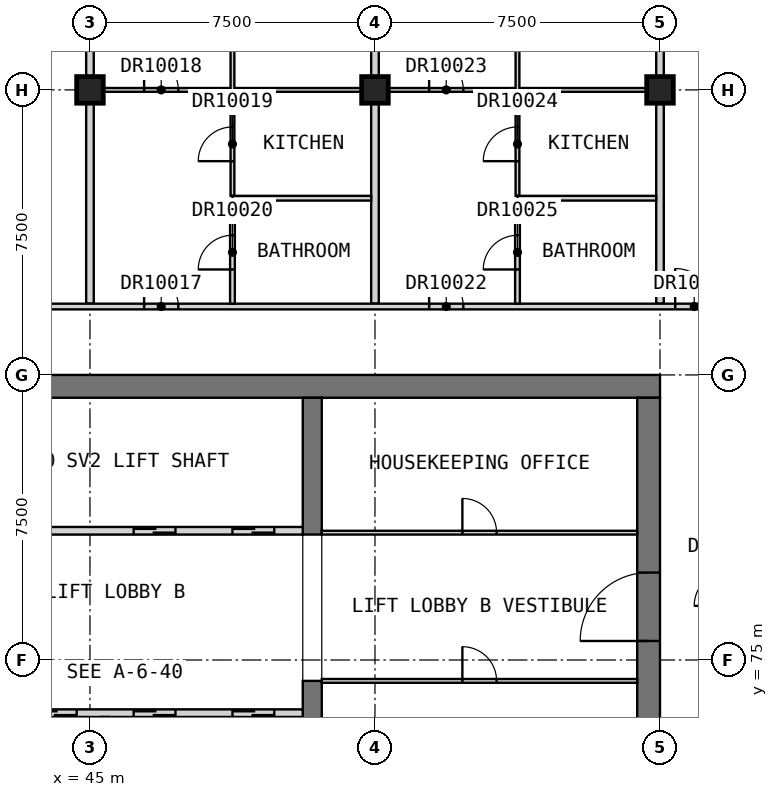
"""IFC4 building model, lengths in metres.
Left out: names, types, materials, properties, quantities, classifications, styles, units other than length and angle.
Written with IfcOpenShell. Run it as: python <this file> out.ifc"""

import sys

from ifc_helpers import new_model, si_unit, direction, frame, frame_2d, origin, origin_2d, place, context, subcontext, project, spatial, rectangle, extrude, element, fill, save


model = new_model("IFC4")
c1 = context("Model", 3, precision=1e-05, world=origin(), true_north=direction((0.0, 1.0)))
c2 = subcontext(c1, "Body", "Model", "MODEL_VIEW")
j1 = project(units=[si_unit("LENGTHUNIT", "METRE"), si_unit("PLANEANGLEUNIT", "RADIAN")], contexts=[c1])
p1 = place(None, origin())
s1 = spatial("IfcSite", under=j1, at=p1, CompositionType="ELEMENT")
p2 = place(p1, origin())
s2 = spatial("IfcBuilding", under=s1, at=p2, CompositionType="ELEMENT")
p3 = place(p2, frame((0.0, 0.0, 273.2)))
s3 = spatial("IfcBuildingStorey", under=s2, at=p3, CompositionType="ELEMENT", Elevation=273.2)
for number, where, z_axis, x_axis in (
    (1, (45.0, 90.0, 0.0), (0.0, 0.0, 1.0), (1.0, 0.0, 0.0)),
    (2, (52.5, 90.0, 0.0), (0.0, 0.0, 1.0), (1.0, 0.0, 0.0)),
    (3, (60.0, 90.0, 0.0), (0.0, 0.0, 1.0), (1.0, 0.0, 0.0)),
):
    element("IfcColumn", number, at=place(p3, frame(where, z_axis=z_axis, x_axis=x_axis)), inside=s3, PredefinedType="COLUMN", context=c2, shape_type="SweptSolid", body=[
        extrude(rectangle(XDim=0.7, YDim=0.7, at=origin_2d()), origin(), (0.0, 0.0, 1.0), 3.5),
    ])
p4 = place(p3, frame((30.0, 82.2, 0.0), z_axis=(0.0, 0.0, 1.0), x_axis=(1.0, 0.0, 0.0)))
e4 = element("IfcWall", 4, at=p4, inside=s3, PredefinedType="SHEAR", context=c2, shape_type="SweptSolid", body=[
    extrude(rectangle(XDim=30.0, YDim=0.6, at=frame_2d((15.0, 0.0))), origin(), (0.0, 0.0, 1.0), 3.5),
])
p5 = place(p3, frame((59.7, 60.6, 0.0), z_axis=(0.0, 0.0, 1.0), x_axis=(0.0, 1.0, 0.0)))
e5 = element("IfcWall", 5, at=p5, inside=s3, PredefinedType="SHEAR", context=c2, shape_type="SweptSolid", body=[
    extrude(rectangle(XDim=21.3, YDim=0.6, at=frame_2d((10.65, 0.0))), origin(), (0.0, 0.0, 1.0), 3.5),
])
p6 = place(p5, frame((14.9, 0.0, 0.0)))
e6 = element("IfcOpeningElement", 6, at=p6, cuts=e5, PredefinedType="OPENING", context=c2, shape_type="SweptSolid", body=[
    extrude(rectangle(XDim=1.8, YDim=2.1, at=frame_2d((0.9, 1.05))), frame((0.0, 0.31, 0.0), z_axis=(0.0, -1.0, 0.0), x_axis=(1.0, 0.0, 0.0)), (0.0, 0.0, 1.0), 0.62),
])
p7 = place(p3, frame((50.85, 68.05, 0.0), z_axis=(0.0, 0.0, 1.0), x_axis=(0.0, 1.0, 0.0)))
e7 = element("IfcWall", 7, at=p7, inside=s3, PredefinedType="SHEAR", context=c2, shape_type="SweptSolid", body=[
    extrude(rectangle(XDim=6.4, YDim=0.5, at=frame_2d((3.2, 0.0))), origin(), (0.0, 0.0, 1.0), 3.5),
])
p8 = place(p3, frame((50.85, 78.3, 0.0), z_axis=(0.0, 0.0, 1.0), x_axis=(0.0, 1.0, 0.0)))
e8 = element("IfcWall", 8, at=p8, inside=s3, PredefinedType="SHEAR", context=c2, shape_type="SweptSolid", body=[
    extrude(rectangle(XDim=3.6, YDim=0.5, at=frame_2d((1.8, 0.0))), origin(), (0.0, 0.0, 1.0), 3.5),
])
p9 = place(p3, frame((35.0, 73.6, 0.0), z_axis=(0.0, 0.0, 1.0), x_axis=(1.0, 0.0, 0.0)))
e9 = element("IfcWall", 9, at=p9, inside=s3, PredefinedType="SOLIDWALL", context=c2, shape_type="SweptSolid", body=[
    extrude(rectangle(XDim=15.6, YDim=0.2, at=frame_2d((7.8, 0.0))), origin(), (0.0, 0.0, 1.0), 3.5),
])
p10 = place(p9, frame((0.75, 0.0, 0.0)))
e10 = element("IfcOpeningElement", 10, at=p10, cuts=e9, PredefinedType="OPENING", context=c2, shape_type="SweptSolid", body=[
    extrude(rectangle(XDim=1.1, YDim=2.1, at=frame_2d((0.55, 1.05))), frame((0.0, 0.11, 0.0), z_axis=(0.0, -1.0, 0.0), x_axis=(1.0, 0.0, 0.0)), (0.0, 0.0, 1.0), 0.22),
])
p11 = place(p9, frame((3.35, 0.0, 0.0)))
e11 = element("IfcOpeningElement", 11, at=p11, cuts=e9, PredefinedType="OPENING", context=c2, shape_type="SweptSolid", body=[
    extrude(rectangle(XDim=1.1, YDim=2.1, at=frame_2d((0.55, 1.05))), frame((0.0, 0.11, 0.0), z_axis=(0.0, -1.0, 0.0), x_axis=(1.0, 0.0, 0.0)), (0.0, 0.0, 1.0), 0.22),
])
p12 = place(p9, frame((5.95, 0.0, 0.0)))
e12 = element("IfcOpeningElement", 12, at=p12, cuts=e9, PredefinedType="OPENING", context=c2, shape_type="SweptSolid", body=[
    extrude(rectangle(XDim=1.1, YDim=2.1, at=frame_2d((0.55, 1.05))), frame((0.0, 0.11, 0.0), z_axis=(0.0, -1.0, 0.0), x_axis=(1.0, 0.0, 0.0)), (0.0, 0.0, 1.0), 0.22),
])
p13 = place(p9, frame((8.55, 0.0, 0.0)))
e13 = element("IfcOpeningElement", 13, at=p13, cuts=e9, PredefinedType="OPENING", context=c2, shape_type="SweptSolid", body=[
    extrude(rectangle(XDim=1.1, YDim=2.1, at=frame_2d((0.55, 1.05))), frame((0.0, 0.11, 0.0), z_axis=(0.0, -1.0, 0.0), x_axis=(1.0, 0.0, 0.0)), (0.0, 0.0, 1.0), 0.22),
])
p14 = place(p9, frame((11.15, 0.0, 0.0)))
e14 = element("IfcOpeningElement", 14, at=p14, cuts=e9, PredefinedType="OPENING", context=c2, shape_type="SweptSolid", body=[
    extrude(rectangle(XDim=1.1, YDim=2.1, at=frame_2d((0.55, 1.05))), frame((0.0, 0.11, 0.0), z_axis=(0.0, -1.0, 0.0), x_axis=(1.0, 0.0, 0.0)), (0.0, 0.0, 1.0), 0.22),
])
p15 = place(p9, frame((13.75, 0.0, 0.0)))
e15 = element("IfcOpeningElement", 15, at=p15, cuts=e9, PredefinedType="OPENING", context=c2, shape_type="SweptSolid", body=[
    extrude(rectangle(XDim=1.1, YDim=2.1, at=frame_2d((0.55, 1.05))), frame((0.0, 0.11, 0.0), z_axis=(0.0, -1.0, 0.0), x_axis=(1.0, 0.0, 0.0)), (0.0, 0.0, 1.0), 0.22),
])
p16 = place(p3, frame((35.0, 78.4, 0.0), z_axis=(0.0, 0.0, 1.0), x_axis=(1.0, 0.0, 0.0)))
e16 = element("IfcWall", 16, at=p16, inside=s3, PredefinedType="SOLIDWALL", context=c2, shape_type="SweptSolid", body=[
    extrude(rectangle(XDim=15.6, YDim=0.2, at=frame_2d((7.8, 0.0))), origin(), (0.0, 0.0, 1.0), 3.5),
])
p17 = place(p16, frame((0.75, 0.0, 0.0)))
e17 = element("IfcOpeningElement", 17, at=p17, cuts=e16, PredefinedType="OPENING", context=c2, shape_type="SweptSolid", body=[
    extrude(rectangle(XDim=1.1, YDim=2.1, at=frame_2d((0.55, 1.05))), frame((0.0, 0.11, 0.0), z_axis=(0.0, -1.0, 0.0), x_axis=(1.0, 0.0, 0.0)), (0.0, 0.0, 1.0), 0.22),
])
p18 = place(p16, frame((3.35, 0.0, 0.0)))
e18 = element("IfcOpeningElement", 18, at=p18, cuts=e16, PredefinedType="OPENING", context=c2, shape_type="SweptSolid", body=[
    extrude(rectangle(XDim=1.1, YDim=2.1, at=frame_2d((0.55, 1.05))), frame((0.0, 0.11, 0.0), z_axis=(0.0, -1.0, 0.0), x_axis=(1.0, 0.0, 0.0)), (0.0, 0.0, 1.0), 0.22),
])
p19 = place(p16, frame((11.15, 0.0, 0.0)))
e19 = element("IfcOpeningElement", 19, at=p19, cuts=e16, PredefinedType="OPENING", context=c2, shape_type="SweptSolid", body=[
    extrude(rectangle(XDim=1.1, YDim=2.1, at=frame_2d((0.55, 1.05))), frame((0.0, 0.11, 0.0), z_axis=(0.0, -1.0, 0.0), x_axis=(1.0, 0.0, 0.0)), (0.0, 0.0, 1.0), 0.22),
])
p20 = place(p16, frame((13.75, 0.0, 0.0)))
e20 = element("IfcOpeningElement", 20, at=p20, cuts=e16, PredefinedType="OPENING", context=c2, shape_type="SweptSolid", body=[
    extrude(rectangle(XDim=1.1, YDim=2.1, at=frame_2d((0.55, 1.05))), frame((0.0, 0.11, 0.0), z_axis=(0.0, -1.0, 0.0), x_axis=(1.0, 0.0, 0.0)), (0.0, 0.0, 1.0), 0.22),
])
p21 = place(p3, frame((51.1, 74.45, 0.0), z_axis=(0.0, 0.0, 1.0), x_axis=(1.0, 0.0, 0.0)))
e21 = element("IfcWall", 21, at=p21, inside=s3, PredefinedType="PARTITIONING", context=c2, shape_type="SweptSolid", body=[
    extrude(rectangle(XDim=8.3, YDim=0.1, at=frame_2d((4.15, 0.0))), origin(), (0.0, 0.0, 1.0), 3.25),
])
p22 = place(p21, frame((3.7, 0.0, 0.0)))
e22 = element("IfcOpeningElement", 22, at=p22, cuts=e21, PredefinedType="OPENING", context=c2, shape_type="SweptSolid", body=[
    extrude(rectangle(XDim=0.9, YDim=2.1, at=frame_2d((0.45, 1.05))), frame((0.0, 0.06, 0.0), z_axis=(0.0, -1.0, 0.0), x_axis=(1.0, 0.0, 0.0)), (0.0, 0.0, 1.0), 0.12),
])
p23 = place(p3, frame((51.1, 78.35, 0.0), z_axis=(0.0, 0.0, 1.0), x_axis=(1.0, 0.0, 0.0)))
e23 = element("IfcWall", 23, at=p23, inside=s3, PredefinedType="PARTITIONING", context=c2, shape_type="SweptSolid", body=[
    extrude(rectangle(XDim=8.3, YDim=0.1, at=frame_2d((4.15, 0.0))), origin(), (0.0, 0.0, 1.0), 3.25),
])
p24 = place(p23, frame((3.7, 0.0, 0.0)))
e24 = element("IfcOpeningElement", 24, at=p24, cuts=e23, PredefinedType="OPENING", context=c2, shape_type="SweptSolid", body=[
    extrude(rectangle(XDim=0.9, YDim=2.1, at=frame_2d((0.45, 1.05))), frame((0.0, 0.06, 0.0), z_axis=(0.0, -1.0, 0.0), x_axis=(1.0, 0.0, 0.0)), (0.0, 0.0, 1.0), 0.12),
])
for number, where, z_axis, x_axis in (
    (25, (45.0, 84.375, 0.0), (0.0, 0.0, 1.0), (0.0, 1.0, 0.0)),
    (26, (52.5, 84.375, 0.0), (0.0, 0.0, 1.0), (0.0, 1.0, 0.0)),
    (27, (60.0, 84.375, 0.0), (0.0, 0.0, 1.0), (0.0, 1.0, 0.0)),
):
    element("IfcWall", number, at=place(p3, frame(where, z_axis=z_axis, x_axis=x_axis)), inside=s3, PredefinedType="PARTITIONING", context=c2, shape_type="SweptSolid", body=[
        extrude(rectangle(XDim=13.125, YDim=0.2, at=frame_2d((6.562, 0.0))), origin(), (0.0, 0.0, 1.0), 3.25),
    ])
p25 = place(p3, frame((33.75, 84.3, 0.0), z_axis=(0.0, 0.0, 1.0), x_axis=(1.0, 0.0, 0.0)))
e28 = element("IfcWall", 28, at=p25, inside=s3, PredefinedType="PARTITIONING", context=c2, shape_type="SweptSolid", body=[
    extrude(rectangle(XDim=28.05, YDim=0.15, at=frame_2d((14.025, 0.0))), origin(), (0.0, 0.0, 1.0), 3.25),
])
p26 = place(p25, frame((5.125, 0.0, 0.0)))
e29 = element("IfcOpeningElement", 29, at=p26, cuts=e28, PredefinedType="OPENING", context=c2, shape_type="SweptSolid", body=[
    extrude(rectangle(XDim=1.0, YDim=2.1, at=frame_2d((0.5, 1.05))), frame((0.0, 0.085, 0.0), z_axis=(0.0, -1.0, 0.0), x_axis=(1.0, 0.0, 0.0)), (0.0, 0.0, 1.0), 0.17),
])
p27 = place(p25, frame((12.675, 0.0, 0.0)))
e30 = element("IfcOpeningElement", 30, at=p27, cuts=e28, PredefinedType="OPENING", context=c2, shape_type="SweptSolid", body=[
    extrude(rectangle(XDim=0.9, YDim=2.1, at=frame_2d((0.45, 1.05))), frame((0.0, 0.085, 0.0), z_axis=(0.0, -1.0, 0.0), x_axis=(1.0, 0.0, 0.0)), (0.0, 0.0, 1.0), 0.17),
])
p28 = place(p25, frame((20.175, 0.0, 0.0)))
e31 = element("IfcOpeningElement", 31, at=p28, cuts=e28, PredefinedType="OPENING", context=c2, shape_type="SweptSolid", body=[
    extrude(rectangle(XDim=0.9, YDim=2.1, at=frame_2d((0.45, 1.05))), frame((0.0, 0.085, 0.0), z_axis=(0.0, -1.0, 0.0), x_axis=(1.0, 0.0, 0.0)), (0.0, 0.0, 1.0), 0.17),
])
p29 = place(p25, frame((26.65, 0.0, 0.0)))
e32 = element("IfcOpeningElement", 32, at=p29, cuts=e28, PredefinedType="OPENING", context=c2, shape_type="SweptSolid", body=[
    extrude(rectangle(XDim=1.0, YDim=2.1, at=frame_2d((0.5, 1.05))), frame((0.0, 0.085, 0.0), z_axis=(0.0, -1.0, 0.0), x_axis=(1.0, 0.0, 0.0)), (0.0, 0.0, 1.0), 0.17),
])
p30 = place(p3, frame((45.1, 90.0, 0.0), z_axis=(0.0, 0.0, 1.0), x_axis=(1.0, 0.0, 0.0)))
e33 = element("IfcWall", 33, at=p30, inside=s3, PredefinedType="PARTITIONING", context=c2, shape_type="SweptSolid", body=[
    extrude(rectangle(XDim=14.8, YDim=0.1, at=frame_2d((7.4, 0.0))), origin(), (0.0, 0.0, 1.0), 3.25),
])
p31 = place(p30, frame((1.325, 0.0, 0.0)))
e34 = element("IfcOpeningElement", 34, at=p31, cuts=e33, PredefinedType="OPENING", context=c2, shape_type="SweptSolid", body=[
    extrude(rectangle(XDim=0.9, YDim=2.1, at=frame_2d((0.45, 1.05))), frame((0.0, 0.06, 0.0), z_axis=(0.0, -1.0, 0.0), x_axis=(1.0, 0.0, 0.0)), (0.0, 0.0, 1.0), 0.12),
])
p32 = place(p30, frame((8.825, 0.0, 0.0)))
e35 = element("IfcOpeningElement", 35, at=p32, cuts=e33, PredefinedType="OPENING", context=c2, shape_type="SweptSolid", body=[
    extrude(rectangle(XDim=0.9, YDim=2.1, at=frame_2d((0.45, 1.05))), frame((0.0, 0.06, 0.0), z_axis=(0.0, -1.0, 0.0), x_axis=(1.0, 0.0, 0.0)), (0.0, 0.0, 1.0), 0.12),
])
p33 = place(p3, frame((48.75, 87.212, 0.0), z_axis=(0.0, 0.0, 1.0), x_axis=(0.0, 1.0, 0.0)))
e36 = element("IfcWall", 36, at=p33, inside=s3, PredefinedType="PARTITIONING", context=c2, shape_type="SweptSolid", body=[
    extrude(rectangle(XDim=9.478, YDim=0.1, at=frame_2d((4.739, 0.0))), origin(), (0.0, 0.0, 1.0), 3.25),
])
p34 = place(p33, frame((0.913, 0.0, 0.0)))
e37 = element("IfcOpeningElement", 37, at=p34, cuts=e36, PredefinedType="OPENING", context=c2, shape_type="SweptSolid", body=[
    extrude(rectangle(XDim=0.9, YDim=2.1, at=frame_2d((0.45, 1.05))), frame((0.0, 0.06, 0.0), z_axis=(0.0, -1.0, 0.0), x_axis=(1.0, 0.0, 0.0)), (0.0, 0.0, 1.0), 0.12),
])
p35 = place(p33, frame((6.087, 0.0, 0.0)))
e38 = element("IfcOpeningElement", 38, at=p35, cuts=e36, PredefinedType="OPENING", context=c2, shape_type="SweptSolid", body=[
    extrude(rectangle(XDim=0.9, YDim=2.1, at=frame_2d((0.45, 1.05))), frame((0.0, 0.06, 0.0), z_axis=(0.0, -1.0, 0.0), x_axis=(1.0, 0.0, 0.0)), (0.0, 0.0, 1.0), 0.12),
])
p36 = place(p3, frame((56.25, 87.212, 0.0), z_axis=(0.0, 0.0, 1.0), x_axis=(0.0, 1.0, 0.0)))
e39 = element("IfcWall", 39, at=p36, inside=s3, PredefinedType="PARTITIONING", context=c2, shape_type="SweptSolid", body=[
    extrude(rectangle(XDim=9.478, YDim=0.1, at=frame_2d((4.739, 0.0))), origin(), (0.0, 0.0, 1.0), 3.25),
])
p37 = place(p36, frame((0.913, 0.0, 0.0)))
e40 = element("IfcOpeningElement", 40, at=p37, cuts=e39, PredefinedType="OPENING", context=c2, shape_type="SweptSolid", body=[
    extrude(rectangle(XDim=0.9, YDim=2.1, at=frame_2d((0.45, 1.05))), frame((0.0, 0.06, 0.0), z_axis=(0.0, -1.0, 0.0), x_axis=(1.0, 0.0, 0.0)), (0.0, 0.0, 1.0), 0.12),
])
p38 = place(p36, frame((6.087, 0.0, 0.0)))
e41 = element("IfcOpeningElement", 41, at=p38, cuts=e39, PredefinedType="OPENING", context=c2, shape_type="SweptSolid", body=[
    extrude(rectangle(XDim=0.9, YDim=2.1, at=frame_2d((0.45, 1.05))), frame((0.0, 0.06, 0.0), z_axis=(0.0, -1.0, 0.0), x_axis=(1.0, 0.0, 0.0)), (0.0, 0.0, 1.0), 0.12),
])
for number, where, z_axis, x_axis in (
    (42, (48.75, 87.15, 0.0), (0.0, 0.0, 1.0), (1.0, 0.0, 0.0)),
    (43, (56.25, 87.15, 0.0), (0.0, 0.0, 1.0), (1.0, 0.0, 0.0)),
):
    element("IfcWall", number, at=place(p3, frame(where, z_axis=z_axis, x_axis=x_axis)), inside=s3, PredefinedType="PARTITIONING", context=c2, shape_type="SweptSolid", body=[
        extrude(rectangle(XDim=3.65, YDim=0.125, at=frame_2d((1.825, 0.0))), origin(), (0.0, 0.0, 1.0), 3.25),
    ])
p39 = place(p3, frame((48.75, 84.375, 0.0), z_axis=(0.0, 0.0, 1.0), x_axis=(0.0, 1.0, 0.0)))
e44 = element("IfcWall", 44, at=p39, inside=s3, PredefinedType="PARTITIONING", context=c2, shape_type="SweptSolid", body=[
    extrude(rectangle(XDim=2.712, YDim=0.125, at=frame_2d((1.356, 0.0))), origin(), (0.0, 0.0, 1.0), 3.25),
])
p40 = place(p39, frame((0.9, 0.0, 0.0)))
e45 = element("IfcOpeningElement", 45, at=p40, cuts=e44, PredefinedType="OPENING", context=c2, shape_type="SweptSolid", body=[
    extrude(rectangle(XDim=0.9, YDim=2.1, at=frame_2d((0.45, 1.05))), frame((0.0, 0.073, 0.0), z_axis=(0.0, -1.0, 0.0), x_axis=(1.0, 0.0, 0.0)), (0.0, 0.0, 1.0), 0.145),
])
p41 = place(p3, frame((56.25, 84.375, 0.0), z_axis=(0.0, 0.0, 1.0), x_axis=(0.0, 1.0, 0.0)))
e46 = element("IfcWall", 46, at=p41, inside=s3, PredefinedType="PARTITIONING", context=c2, shape_type="SweptSolid", body=[
    extrude(rectangle(XDim=2.712, YDim=0.125, at=frame_2d((1.356, 0.0))), origin(), (0.0, 0.0, 1.0), 3.25),
])
p42 = place(p41, frame((0.9, 0.0, 0.0)))
e47 = element("IfcOpeningElement", 47, at=p42, cuts=e46, PredefinedType="OPENING", context=c2, shape_type="SweptSolid", body=[
    extrude(rectangle(XDim=0.9, YDim=2.1, at=frame_2d((0.45, 1.05))), frame((0.0, 0.073, 0.0), z_axis=(0.0, -1.0, 0.0), x_axis=(1.0, 0.0, 0.0)), (0.0, 0.0, 1.0), 0.145),
])
p43 = place(p13, origin())
e48 = element("IfcDoor", 48, at=p43, inside=s3, OperationType="DOUBLE_DOOR_SLIDING", PredefinedType="DOOR", context=c2, shape_type="SweptSolid", body=[
    extrude(rectangle(XDim=1.1, YDim=2.1, at=frame_2d((0.55, 1.05))), frame((0.0, 0.025, 0.0), z_axis=(0.0, -1.0, 0.0), x_axis=(1.0, 0.0, 0.0)), (0.0, 0.0, 1.0), 0.05),
])
fill(e13, e48)
p44 = place(p14, origin())
e49 = element("IfcDoor", 49, at=p44, inside=s3, OperationType="DOUBLE_DOOR_SLIDING", PredefinedType="DOOR", context=c2, shape_type="SweptSolid", body=[
    extrude(rectangle(XDim=1.1, YDim=2.1, at=frame_2d((0.55, 1.05))), frame((0.0, 0.025, 0.0), z_axis=(0.0, -1.0, 0.0), x_axis=(1.0, 0.0, 0.0)), (0.0, 0.0, 1.0), 0.05),
])
fill(e14, e49)
p45 = place(p15, origin())
e50 = element("IfcDoor", 50, at=p45, inside=s3, OperationType="DOUBLE_DOOR_SLIDING", PredefinedType="DOOR", context=c2, shape_type="SweptSolid", body=[
    extrude(rectangle(XDim=1.1, YDim=2.1, at=frame_2d((0.55, 1.05))), frame((0.0, 0.025, 0.0), z_axis=(0.0, -1.0, 0.0), x_axis=(1.0, 0.0, 0.0)), (0.0, 0.0, 1.0), 0.05),
])
fill(e15, e50)
p46 = place(p19, origin())
e51 = element("IfcDoor", 51, at=p46, inside=s3, OperationType="DOUBLE_DOOR_SLIDING", PredefinedType="DOOR", context=c2, shape_type="SweptSolid", body=[
    extrude(rectangle(XDim=1.1, YDim=2.1, at=frame_2d((0.55, 1.05))), frame((0.0, 0.025, 0.0), z_axis=(0.0, -1.0, 0.0), x_axis=(1.0, 0.0, 0.0)), (0.0, 0.0, 1.0), 0.05),
])
fill(e19, e51)
p47 = place(p20, origin())
e52 = element("IfcDoor", 52, at=p47, inside=s3, OperationType="DOUBLE_DOOR_SLIDING", PredefinedType="DOOR", context=c2, shape_type="SweptSolid", body=[
    extrude(rectangle(XDim=1.1, YDim=2.1, at=frame_2d((0.55, 1.05))), frame((0.0, 0.025, 0.0), z_axis=(0.0, -1.0, 0.0), x_axis=(1.0, 0.0, 0.0)), (0.0, 0.0, 1.0), 0.05),
])
fill(e20, e52)
p48 = place(p6, origin())
e53 = element("IfcDoor", 53, at=p48, inside=s3, OperationType="DOUBLE_DOOR_SINGLE_SWING", PredefinedType="DOOR", context=c2, shape_type="SweptSolid", body=[
    extrude(rectangle(XDim=1.8, YDim=2.1, at=frame_2d((0.9, 1.05))), frame((0.0, 0.025, 0.0), z_axis=(0.0, -1.0, 0.0), x_axis=(1.0, 0.0, 0.0)), (0.0, 0.0, 1.0), 0.05),
])
fill(e6, e53)
p49 = place(p22, origin())
e54 = element("IfcDoor", 54, at=p49, inside=s3, OperationType="SINGLE_SWING_RIGHT", PredefinedType="DOOR", context=c2, shape_type="SweptSolid", body=[
    extrude(rectangle(XDim=0.9, YDim=2.1, at=frame_2d((0.45, 1.05))), frame((0.0, 0.025, 0.0), z_axis=(0.0, -1.0, 0.0), x_axis=(1.0, 0.0, 0.0)), (0.0, 0.0, 1.0), 0.05),
])
fill(e22, e54)
p50 = place(p24, origin())
e55 = element("IfcDoor", 55, at=p50, inside=s3, OperationType="SINGLE_SWING_RIGHT", PredefinedType="DOOR", context=c2, shape_type="SweptSolid", body=[
    extrude(rectangle(XDim=0.9, YDim=2.1, at=frame_2d((0.45, 1.05))), frame((0.0, 0.025, 0.0), z_axis=(0.0, -1.0, 0.0), x_axis=(1.0, 0.0, 0.0)), (0.0, 0.0, 1.0), 0.05),
])
fill(e24, e55)
p51 = place(p27, origin())
e56 = element("IfcDoor", 56, at=p51, inside=s3, OperationType="SINGLE_SWING_LEFT", PredefinedType="DOOR", context=c2, shape_type="SweptSolid", body=[
    extrude(rectangle(XDim=0.9, YDim=2.1, at=frame_2d((0.45, 1.05))), frame((0.0, 0.025, 0.0), z_axis=(0.0, -1.0, 0.0), x_axis=(1.0, 0.0, 0.0)), (0.0, 0.0, 1.0), 0.05),
])
fill(e30, e56)
p52 = place(p31, origin())
e57 = element("IfcDoor", 57, at=p52, inside=s3, OperationType="SINGLE_SWING_RIGHT", PredefinedType="DOOR", context=c2, shape_type="SweptSolid", body=[
    extrude(rectangle(XDim=0.9, YDim=2.1, at=frame_2d((0.45, 1.05))), frame((0.0, 0.025, 0.0), z_axis=(0.0, -1.0, 0.0), x_axis=(1.0, 0.0, 0.0)), (0.0, 0.0, 1.0), 0.05),
])
fill(e34, e57)
p53 = place(p34, origin())
e58 = element("IfcDoor", 58, at=p53, inside=s3, OperationType="SINGLE_SWING_LEFT", PredefinedType="DOOR", context=c2, shape_type="SweptSolid", body=[
    extrude(rectangle(XDim=0.9, YDim=2.1, at=frame_2d((0.45, 1.05))), frame((0.0, 0.025, 0.0), z_axis=(0.0, -1.0, 0.0), x_axis=(1.0, 0.0, 0.0)), (0.0, 0.0, 1.0), 0.05),
])
fill(e37, e58)
p54 = place(p40, origin())
e59 = element("IfcDoor", 59, at=p54, inside=s3, OperationType="SINGLE_SWING_RIGHT", PredefinedType="DOOR", context=c2, shape_type="SweptSolid", body=[
    extrude(rectangle(XDim=0.9, YDim=2.1, at=frame_2d((0.45, 1.05))), frame((0.0, 0.025, 0.0), z_axis=(0.0, -1.0, 0.0), x_axis=(1.0, 0.0, 0.0)), (0.0, 0.0, 1.0), 0.05),
])
fill(e45, e59)
p55 = place(p28, origin())
e60 = element("IfcDoor", 60, at=p55, inside=s3, OperationType="SINGLE_SWING_LEFT", PredefinedType="DOOR", context=c2, shape_type="SweptSolid", body=[
    extrude(rectangle(XDim=0.9, YDim=2.1, at=frame_2d((0.45, 1.05))), frame((0.0, 0.025, 0.0), z_axis=(0.0, -1.0, 0.0), x_axis=(1.0, 0.0, 0.0)), (0.0, 0.0, 1.0), 0.05),
])
fill(e31, e60)
p56 = place(p32, origin())
e61 = element("IfcDoor", 61, at=p56, inside=s3, OperationType="SINGLE_SWING_RIGHT", PredefinedType="DOOR", context=c2, shape_type="SweptSolid", body=[
    extrude(rectangle(XDim=0.9, YDim=2.1, at=frame_2d((0.45, 1.05))), frame((0.0, 0.025, 0.0), z_axis=(0.0, -1.0, 0.0), x_axis=(1.0, 0.0, 0.0)), (0.0, 0.0, 1.0), 0.05),
])
fill(e35, e61)
p57 = place(p37, origin())
e62 = element("IfcDoor", 62, at=p57, inside=s3, OperationType="SINGLE_SWING_LEFT", PredefinedType="DOOR", context=c2, shape_type="SweptSolid", body=[
    extrude(rectangle(XDim=0.9, YDim=2.1, at=frame_2d((0.45, 1.05))), frame((0.0, 0.025, 0.0), z_axis=(0.0, -1.0, 0.0), x_axis=(1.0, 0.0, 0.0)), (0.0, 0.0, 1.0), 0.05),
])
fill(e40, e62)
p58 = place(p42, origin())
e63 = element("IfcDoor", 63, at=p58, inside=s3, OperationType="SINGLE_SWING_RIGHT", PredefinedType="DOOR", context=c2, shape_type="SweptSolid", body=[
    extrude(rectangle(XDim=0.9, YDim=2.1, at=frame_2d((0.45, 1.05))), frame((0.0, 0.025, 0.0), z_axis=(0.0, -1.0, 0.0), x_axis=(1.0, 0.0, 0.0)), (0.0, 0.0, 1.0), 0.05),
])
fill(e47, e63)
p59 = place(p29, origin())
e64 = element("IfcDoor", 64, at=p59, inside=s3, OperationType="SINGLE_SWING_LEFT", PredefinedType="DOOR", context=c2, shape_type="SweptSolid", body=[
    extrude(rectangle(XDim=1.0, YDim=2.1, at=frame_2d((0.5, 1.05))), frame((0.0, 0.025, 0.0), z_axis=(0.0, -1.0, 0.0), x_axis=(1.0, 0.0, 0.0)), (0.0, 0.0, 1.0), 0.05),
])
fill(e32, e64)
save(model, sys.argv[1])
